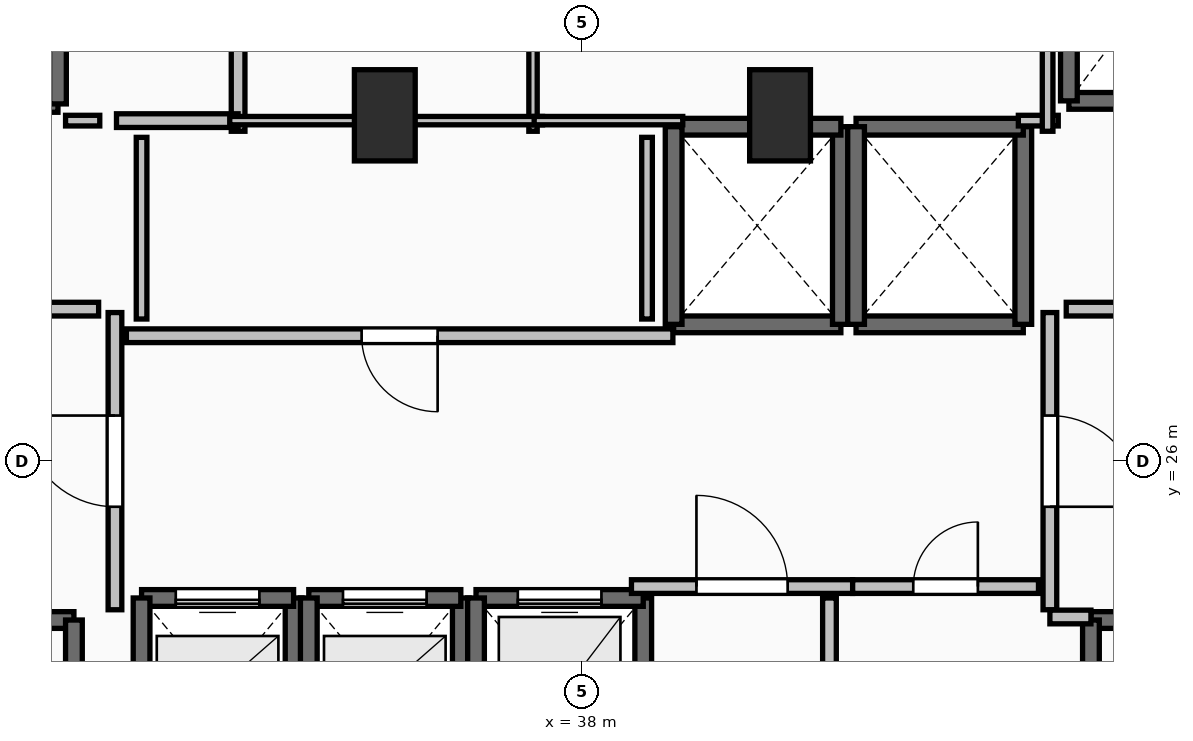
"""IFC4 building model, lengths in metres.
Left out: names, types, materials, properties, quantities, classifications, styles, units other than length and angle.
Written with IfcOpenShell. Run it as: python <this file> out.ifc"""

import sys

from ifc_helpers import new_model, si_unit, direction, frame, frame_2d, origin, origin_2d, place, context, subcontext, project, spatial, rectangle, extrude, element, fill, save


model = new_model("IFC4")
c1 = context("Model", 3, precision=1e-05, world=origin(), true_north=direction((0.0, 1.0)))
c2 = subcontext(c1, "Body", "Model", "MODEL_VIEW")
j1 = project(units=[si_unit("LENGTHUNIT", "METRE"), si_unit("PLANEANGLEUNIT", "RADIAN")], contexts=[c1])
p1 = place(None, origin())
s1 = spatial("IfcSite", under=j1, at=p1, CompositionType="ELEMENT")
p2 = place(p1, origin())
s2 = spatial("IfcBuilding", under=s1, at=p2, CompositionType="ELEMENT")
p3 = place(p2, frame((0.0, 0.0, 150.1)))
s3 = spatial("IfcBuildingStorey", under=s2, at=p3, CompositionType="ELEMENT", Elevation=150.1)
for number, where, z_axis, x_axis in (
    (1, (35.4, 30.55, 0.0), (0.0, 0.0, 1.0), (1.0, 0.0, 0.0)),
    (2, (40.6, 30.55, 0.0), (0.0, 0.0, 1.0), (1.0, 0.0, 0.0)),
):
    element("IfcColumn", number, at=place(p3, frame(where, z_axis=z_axis, x_axis=x_axis)), inside=s3, PredefinedType="PILASTER", context=c2, shape_type="SweptSolid", body=[
        extrude(rectangle(XDim=0.8, YDim=1.2, at=origin_2d()), origin(), (0.0, 0.0, 1.0), 3.5),
    ])
p4 = place(p3, frame((27.94, 23.91, 0.0), z_axis=(0.0, 0.0, 1.0), x_axis=(1.0, 0.0, 0.0)))
e3 = element("IfcWall", 3, at=p4, inside=s3, PredefinedType="SOLIDWALL", context=c2, shape_type="SweptSolid", body=[
    extrude(rectangle(XDim=3.37, YDim=0.22, at=frame_2d((1.685, 0.0))), origin(), (0.0, 0.0, 1.0), 3.24),
])
p5 = place(p4, frame((1.135, 0.0, 0.0)))
e4 = element("IfcOpeningElement", 4, at=p5, cuts=e3, PredefinedType="OPENING", context=c2, shape_type="SweptSolid", body=[
    extrude(rectangle(XDim=1.1, YDim=2.15, at=frame_2d((0.55, 1.075))), frame((0.0, 0.125, 0.0), z_axis=(0.0, -1.0, 0.0), x_axis=(1.0, 0.0, 0.0)), (0.0, 0.0, 1.0), 0.25),
])
p6 = place(p3, frame((31.31, 23.91, 0.0), z_axis=(0.0, 0.0, 1.0), x_axis=(0.0, -1.0, 0.0)))
e5 = element("IfcWall", 5, at=p6, inside=s3, PredefinedType="SOLIDWALL", context=c2, shape_type="SweptSolid", body=[
    extrude(rectangle(XDim=7.42, YDim=0.22, at=frame_2d((3.71, 0.0))), origin(), (0.0, 0.0, 1.0), 3.24),
])
p7 = place(p3, frame((44.69, 23.91, 0.0), z_axis=(0.0, 0.0, 1.0), x_axis=(1.0, 0.0, 0.0)))
e6 = element("IfcWall", 6, at=p7, inside=s3, PredefinedType="SOLIDWALL", context=c2, shape_type="SweptSolid", body=[
    extrude(rectangle(XDim=3.37, YDim=0.22, at=frame_2d((1.685, 0.0))), origin(), (0.0, 0.0, 1.0), 3.24),
])
p8 = place(p7, frame((1.135, 0.0, 0.0)))
e7 = element("IfcOpeningElement", 7, at=p8, cuts=e6, PredefinedType="OPENING", context=c2, shape_type="SweptSolid", body=[
    extrude(rectangle(XDim=1.1, YDim=2.15, at=frame_2d((0.55, 1.075))), frame((0.0, 0.125, 0.0), z_axis=(0.0, -1.0, 0.0), x_axis=(1.0, 0.0, 0.0)), (0.0, 0.0, 1.0), 0.25),
])
p9 = place(p3, frame((44.69, 16.49, 0.0), z_axis=(0.0, 0.0, 1.0), x_axis=(0.0, 1.0, 0.0)))
e8 = element("IfcWall", 8, at=p9, inside=s3, PredefinedType="SOLIDWALL", context=c2, shape_type="SweptSolid", body=[
    extrude(rectangle(XDim=7.42, YDim=0.22, at=frame_2d((3.71, 0.0))), origin(), (0.0, 0.0, 1.0), 3.24),
])
p10 = place(p3, frame((34.2, 21.8, 0.0), z_axis=(0.0, 0.0, 1.0), x_axis=(0.0, 1.0, 0.0)))
e9 = element("IfcWall", 9, at=p10, inside=s3, PredefinedType="SOLIDWALL", context=c2, shape_type="SweptSolid", body=[
    extrude(rectangle(XDim=2.4, YDim=0.22, at=frame_2d((1.2, 0.0))), origin(), (0.0, 0.0, 1.0), 3.24),
])
p11 = place(p3, frame((34.2, 24.2, 0.0), z_axis=(0.0, 0.0, 1.0), x_axis=(-1.0, 0.0, 0.0)))
e10 = element("IfcWall", 10, at=p11, inside=s3, PredefinedType="SOLIDWALL", context=c2, shape_type="SweptSolid", body=[
    extrude(rectangle(XDim=2.0, YDim=0.22, at=frame_2d((1.0, 0.0))), origin(), (0.0, 0.0, 1.0), 3.24),
])
p12 = place(p11, frame((0.45, 0.0, 0.0)))
e11 = element("IfcOpeningElement", 11, at=p12, cuts=e10, PredefinedType="OPENING", context=c2, shape_type="SweptSolid", body=[
    extrude(rectangle(XDim=1.1, YDim=2.2, at=frame_2d((0.55, 1.1))), frame((0.0, 0.125, 0.0), z_axis=(0.0, -1.0, 0.0), x_axis=(1.0, 0.0, 0.0)), (0.0, 0.0, 1.0), 0.25),
])
for number, where, z_axis, x_axis in (
    (12, (32.2, 24.2, 0.0), (0.0, 0.0, 1.0), (0.0, -1.0, 0.0)),
    (13, (36.4, 21.8, 0.0), (0.0, 0.0, 1.0), (0.0, 1.0, 0.0)),
):
    element("IfcWall", number, at=place(p3, frame(where, z_axis=z_axis, x_axis=x_axis)), inside=s3, PredefinedType="SOLIDWALL", context=c2, shape_type="SweptSolid", body=[
        extrude(rectangle(XDim=2.4, YDim=0.22, at=frame_2d((1.2, 0.0))), origin(), (0.0, 0.0, 1.0), 3.24),
    ])
p13 = place(p3, frame((36.4, 24.2, 0.0), z_axis=(0.0, 0.0, 1.0), x_axis=(-1.0, 0.0, 0.0)))
e14 = element("IfcWall", 14, at=p13, inside=s3, PredefinedType="SOLIDWALL", context=c2, shape_type="SweptSolid", body=[
    extrude(rectangle(XDim=2.0, YDim=0.22, at=frame_2d((1.0, 0.0))), origin(), (0.0, 0.0, 1.0), 3.24),
])
p14 = place(p13, frame((0.45, 0.0, 0.0)))
e15 = element("IfcOpeningElement", 15, at=p14, cuts=e14, PredefinedType="OPENING", context=c2, shape_type="SweptSolid", body=[
    extrude(rectangle(XDim=1.1, YDim=2.2, at=frame_2d((0.55, 1.1))), frame((0.0, 0.125, 0.0), z_axis=(0.0, -1.0, 0.0), x_axis=(1.0, 0.0, 0.0)), (0.0, 0.0, 1.0), 0.25),
])
p15 = place(p3, frame((34.4, 24.2, 0.0), z_axis=(0.0, 0.0, 1.0), x_axis=(0.0, -1.0, 0.0)))
e16 = element("IfcWall", 16, at=p15, inside=s3, PredefinedType="SOLIDWALL", context=c2, shape_type="SweptSolid", body=[
    extrude(rectangle(XDim=2.4, YDim=0.22, at=frame_2d((1.2, 0.0))), origin(), (0.0, 0.0, 1.0), 3.24),
])
p16 = place(p3, frame((38.8, 21.6, 0.0), z_axis=(0.0, 0.0, 1.0), x_axis=(0.0, 1.0, 0.0)))
e17 = element("IfcWall", 17, at=p16, inside=s3, PredefinedType="SOLIDWALL", context=c2, shape_type="SweptSolid", body=[
    extrude(rectangle(XDim=2.6, YDim=0.22, at=frame_2d((1.3, 0.0))), origin(), (0.0, 0.0, 1.0), 3.24),
])
p17 = place(p3, frame((38.8, 24.2, 0.0), z_axis=(0.0, 0.0, 1.0), x_axis=(-1.0, 0.0, 0.0)))
e18 = element("IfcWall", 18, at=p17, inside=s3, PredefinedType="SOLIDWALL", context=c2, shape_type="SweptSolid", body=[
    extrude(rectangle(XDim=2.2, YDim=0.22, at=frame_2d((1.1, 0.0))), origin(), (0.0, 0.0, 1.0), 3.24),
])
p18 = place(p17, frame((0.55, 0.0, 0.0)))
e19 = element("IfcOpeningElement", 19, at=p18, cuts=e18, PredefinedType="OPENING", context=c2, shape_type="SweptSolid", body=[
    extrude(rectangle(XDim=1.1, YDim=2.2, at=frame_2d((0.55, 1.1))), frame((0.0, 0.125, 0.0), z_axis=(0.0, -1.0, 0.0), x_axis=(1.0, 0.0, 0.0)), (0.0, 0.0, 1.0), 0.25),
])
p19 = place(p3, frame((36.6, 24.2, 0.0), z_axis=(0.0, 0.0, 1.0), x_axis=(0.0, -1.0, 0.0)))
e20 = element("IfcWall", 20, at=p19, inside=s3, PredefinedType="SOLIDWALL", context=c2, shape_type="SweptSolid", body=[
    extrude(rectangle(XDim=2.6, YDim=0.22, at=frame_2d((1.3, 0.0))), origin(), (0.0, 0.0, 1.0), 3.24),
])
p20 = place(p3, frame((39.2, 27.8, 0.0), z_axis=(0.0, 0.0, 1.0), x_axis=(1.0, 0.0, 0.0)))
e21 = element("IfcWall", 21, at=p20, inside=s3, PredefinedType="SOLIDWALL", context=c2, shape_type="SweptSolid", body=[
    extrude(rectangle(XDim=2.2, YDim=0.22, at=frame_2d((1.1, 0.0))), origin(), (0.0, 0.0, 1.0), 3.24),
])
p21 = place(p3, frame((41.4, 27.8, 0.0), z_axis=(0.0, 0.0, 1.0), x_axis=(0.0, 1.0, 0.0)))
e22 = element("IfcWall", 22, at=p21, inside=s3, PredefinedType="SOLIDWALL", context=c2, shape_type="SweptSolid", body=[
    extrude(rectangle(XDim=2.6, YDim=0.22, at=frame_2d((1.3, 0.0))), origin(), (0.0, 0.0, 1.0), 3.24),
])
p22 = place(p3, frame((41.4, 30.4, 0.0), z_axis=(0.0, 0.0, 1.0), x_axis=(-1.0, 0.0, 0.0)))
e23 = element("IfcWall", 23, at=p22, inside=s3, PredefinedType="SOLIDWALL", context=c2, shape_type="SweptSolid", body=[
    extrude(rectangle(XDim=2.2, YDim=0.22, at=frame_2d((1.1, 0.0))), origin(), (0.0, 0.0, 1.0), 3.24),
])
p23 = place(p3, frame((39.2, 30.4, 0.0), z_axis=(0.0, 0.0, 1.0), x_axis=(0.0, -1.0, 0.0)))
e24 = element("IfcWall", 24, at=p23, inside=s3, PredefinedType="SOLIDWALL", context=c2, shape_type="SweptSolid", body=[
    extrude(rectangle(XDim=2.6, YDim=0.22, at=frame_2d((1.3, 0.0))), origin(), (0.0, 0.0, 1.0), 3.24),
])
p24 = place(p3, frame((41.6, 27.8, 0.0), z_axis=(0.0, 0.0, 1.0), x_axis=(1.0, 0.0, 0.0)))
e25 = element("IfcWall", 25, at=p24, inside=s3, PredefinedType="SOLIDWALL", context=c2, shape_type="SweptSolid", body=[
    extrude(rectangle(XDim=2.2, YDim=0.22, at=frame_2d((1.1, 0.0))), origin(), (0.0, 0.0, 1.0), 3.24),
])
p25 = place(p3, frame((43.8, 27.8, 0.0), z_axis=(0.0, 0.0, 1.0), x_axis=(0.0, 1.0, 0.0)))
e26 = element("IfcWall", 26, at=p25, inside=s3, PredefinedType="SOLIDWALL", context=c2, shape_type="SweptSolid", body=[
    extrude(rectangle(XDim=2.6, YDim=0.22, at=frame_2d((1.3, 0.0))), origin(), (0.0, 0.0, 1.0), 3.24),
])
p26 = place(p3, frame((43.8, 30.4, 0.0), z_axis=(0.0, 0.0, 1.0), x_axis=(-1.0, 0.0, 0.0)))
e27 = element("IfcWall", 27, at=p26, inside=s3, PredefinedType="SOLIDWALL", context=c2, shape_type="SweptSolid", body=[
    extrude(rectangle(XDim=2.2, YDim=0.22, at=frame_2d((1.1, 0.0))), origin(), (0.0, 0.0, 1.0), 3.24),
])
p27 = place(p3, frame((41.6, 30.4, 0.0), z_axis=(0.0, 0.0, 1.0), x_axis=(0.0, -1.0, 0.0)))
e28 = element("IfcWall", 28, at=p27, inside=s3, PredefinedType="SOLIDWALL", context=c2, shape_type="SweptSolid", body=[
    extrude(rectangle(XDim=2.6, YDim=0.22, at=frame_2d((1.3, 0.0))), origin(), (0.0, 0.0, 1.0), 3.24),
])
p28 = place(p3, frame((44.4, 30.74, 0.0), z_axis=(0.0, 0.0, 1.0), x_axis=(1.0, 0.0, 0.0)))
e29 = element("IfcWall", 29, at=p28, inside=s3, PredefinedType="SOLIDWALL", context=c2, shape_type="SweptSolid", body=[
    extrude(rectangle(XDim=1.8, YDim=0.22, at=frame_2d((0.9, 0.0))), origin(), (0.0, 0.0, 1.0), 3.24),
])
p29 = place(p3, frame((44.4, 33.16, 0.0), z_axis=(0.0, 0.0, 1.0), x_axis=(0.0, -1.0, 0.0)))
e30 = element("IfcWall", 30, at=p29, inside=s3, PredefinedType="SOLIDWALL", context=c2, shape_type="SweptSolid", body=[
    extrude(rectangle(XDim=2.42, YDim=0.22, at=frame_2d((1.21, 0.0))), origin(), (0.0, 0.0, 1.0), 3.24),
])
p30 = place(p3, frame((28.1, 30.7, 0.0), z_axis=(0.0, 0.0, 1.0), x_axis=(1.0, 0.0, 0.0)))
e31 = element("IfcWall", 31, at=p30, inside=s3, PredefinedType="SOLIDWALL", context=c2, shape_type="SweptSolid", body=[
    extrude(rectangle(XDim=3.0, YDim=0.22, at=frame_2d((1.5, 0.0))), origin(), (0.0, 0.0, 1.0), 3.24),
])
p31 = place(p3, frame((31.1, 30.7, 0.0), z_axis=(0.0, 0.0, 1.0), x_axis=(0.0, 1.0, 0.0)))
e32 = element("IfcWall", 32, at=p31, inside=s3, PredefinedType="SOLIDWALL", context=c2, shape_type="SweptSolid", body=[
    extrude(rectangle(XDim=2.5, YDim=0.22, at=frame_2d((1.25, 0.0))), origin(), (0.0, 0.0, 1.0), 3.24),
])
p32 = place(p3, frame((31.85, 24.045, 0.0), z_axis=(0.0, 0.0, 1.0), x_axis=(0.0, 1.0, 0.0)))
e33 = element("IfcWall", 33, at=p32, inside=s3, PredefinedType="PARTITIONING", context=c2, shape_type="SweptSolid", body=[
    extrude(rectangle(XDim=3.91, YDim=0.18, at=frame_2d((1.955, 0.0))), origin(), (0.0, 0.0, 1.0), 3.24),
])
p33 = place(p32, frame((1.355, 0.0, 0.0)))
e34 = element("IfcOpeningElement", 34, at=p33, cuts=e33, PredefinedType="OPENING", context=c2, shape_type="SweptSolid", body=[
    extrude(rectangle(XDim=1.2, YDim=2.15, at=frame_2d((0.6, 1.075))), frame((0.0, 0.105, 0.0), z_axis=(0.0, -1.0, 0.0), x_axis=(1.0, 0.0, 0.0)), (0.0, 0.0, 1.0), 0.21),
])
p34 = place(p3, frame((44.15, 27.955, 0.0), z_axis=(0.0, 0.0, 1.0), x_axis=(0.0, -1.0, 0.0)))
e35 = element("IfcWall", 35, at=p34, inside=s3, PredefinedType="PARTITIONING", context=c2, shape_type="SweptSolid", body=[
    extrude(rectangle(XDim=3.91, YDim=0.18, at=frame_2d((1.955, 0.0))), origin(), (0.0, 0.0, 1.0), 3.24),
])
p35 = place(p34, frame((1.355, 0.0, 0.0)))
e36 = element("IfcOpeningElement", 36, at=p35, cuts=e35, PredefinedType="OPENING", context=c2, shape_type="SweptSolid", body=[
    extrude(rectangle(XDim=1.2, YDim=2.15, at=frame_2d((0.6, 1.075))), frame((0.0, 0.105, 0.0), z_axis=(0.0, -1.0, 0.0), x_axis=(1.0, 0.0, 0.0)), (0.0, 0.0, 1.0), 0.21),
])
p36 = place(p3, frame((44.15, 23.95, 0.0), z_axis=(0.0, 0.0, 1.0), x_axis=(1.0, 0.0, 0.0)))
e37 = element("IfcWall", 37, at=p36, inside=s3, PredefinedType="PARTITIONING", context=c2, shape_type="SweptSolid", body=[
    extrude(rectangle(XDim=0.54, YDim=0.18, at=frame_2d((0.27, 0.0))), origin(), (0.0, 0.0, 1.0), 3.24),
])
p37 = place(p3, frame((33.47, 30.34, 0.0), z_axis=(0.0, 0.0, 1.0), x_axis=(0.0, 1.0, 0.0)))
e38 = element("IfcWall", 38, at=p37, inside=s3, PredefinedType="PARTITIONING", context=c2, shape_type="SweptSolid", body=[
    extrude(rectangle(XDim=3.56, YDim=0.18, at=frame_2d((1.78, 0.0))), origin(), (0.0, 0.0, 1.0), 3.24),
])
p38 = place(p3, frame((31.87, 30.48, 0.0), z_axis=(0.0, 0.0, 1.0), x_axis=(1.0, 0.0, 0.0)))
e39 = element("IfcWall", 39, at=p38, inside=s3, PredefinedType="PARTITIONING", context=c2, shape_type="SweptSolid", body=[
    extrude(rectangle(XDim=1.6, YDim=0.18, at=frame_2d((0.8, 0.0))), origin(), (0.0, 0.0, 1.0), 3.24),
])
p39 = place(p3, frame((38.645, 24.35, 0.0), z_axis=(0.0, 0.0, 1.0), x_axis=(1.0, 0.0, 0.0)))
e40 = element("IfcWall", 40, at=p39, inside=s3, PredefinedType="PARTITIONING", context=c2, shape_type="SweptSolid", body=[
    extrude(rectangle(XDim=2.91, YDim=0.18, at=frame_2d((1.455, 0.0))), origin(), (0.0, 0.0, 1.0), 3.24),
])
p40 = place(p39, frame((0.855, 0.0, 0.0)))
e41 = element("IfcOpeningElement", 41, at=p40, cuts=e40, PredefinedType="OPENING", context=c2, shape_type="SweptSolid", body=[
    extrude(rectangle(XDim=1.2, YDim=2.15, at=frame_2d((0.6, 1.075))), frame((0.0, 0.105, 0.0), z_axis=(0.0, -1.0, 0.0), x_axis=(1.0, 0.0, 0.0)), (0.0, 0.0, 1.0), 0.21),
])
p41 = place(p3, frame((41.555, 24.35, 0.0), z_axis=(0.0, 0.0, 1.0), x_axis=(1.0, 0.0, 0.0)))
e42 = element("IfcWall", 42, at=p41, inside=s3, PredefinedType="PARTITIONING", context=c2, shape_type="SweptSolid", body=[
    extrude(rectangle(XDim=2.445, YDim=0.18, at=frame_2d((1.223, 0.0))), origin(), (0.0, 0.0, 1.0), 3.24),
])
p42 = place(p41, frame((0.798, 0.0, 0.0)))
e43 = element("IfcOpeningElement", 43, at=p42, cuts=e42, PredefinedType="OPENING", context=c2, shape_type="SweptSolid", body=[
    extrude(rectangle(XDim=0.85, YDim=2.1, at=frame_2d((0.425, 1.05))), frame((0.0, 0.105, 0.0), z_axis=(0.0, -1.0, 0.0), x_axis=(1.0, 0.0, 0.0)), (0.0, 0.0, 1.0), 0.21),
])
p43 = place(p3, frame((39.19, 27.65, 0.0), z_axis=(0.0, 0.0, 1.0), x_axis=(-1.0, 0.0, 0.0)))
e44 = element("IfcWall", 44, at=p43, inside=s3, PredefinedType="PARTITIONING", context=c2, shape_type="SweptSolid", body=[
    extrude(rectangle(XDim=7.19, YDim=0.18, at=frame_2d((3.595, 0.0))), origin(), (0.0, 0.0, 1.0), 3.24),
])
p44 = place(p43, frame((3.095, 0.0, 0.0)))
e45 = element("IfcOpeningElement", 45, at=p44, cuts=e44, PredefinedType="OPENING", context=c2, shape_type="SweptSolid", body=[
    extrude(rectangle(XDim=1.0, YDim=2.15, at=frame_2d((0.5, 1.075))), frame((0.0, 0.105, 0.0), z_axis=(0.0, -1.0, 0.0), x_axis=(1.0, 0.0, 0.0)), (0.0, 0.0, 1.0), 0.21),
])
p45 = place(p3, frame((41.25, 20.305, 0.0), z_axis=(0.0, 0.0, 1.0), x_axis=(0.0, 1.0, 0.0)))
e46 = element("IfcWall", 46, at=p45, inside=s3, PredefinedType="PARTITIONING", context=c2, shape_type="SweptSolid", body=[
    extrude(rectangle(XDim=3.895, YDim=0.18, at=frame_2d((1.948, 0.0))), origin(), (0.0, 0.0, 1.0), 3.24),
])
p46 = place(p45, frame((1.522, 0.0, 0.0)))
e47 = element("IfcOpeningElement", 47, at=p46, cuts=e46, PredefinedType="OPENING", context=c2, shape_type="SweptSolid", body=[
    extrude(rectangle(XDim=0.85, YDim=2.1, at=frame_2d((0.425, 1.05))), frame((0.0, 0.105, 0.0), z_axis=(0.0, -1.0, 0.0), x_axis=(1.0, 0.0, 0.0)), (0.0, 0.0, 1.0), 0.21),
])
p47 = place(p3, frame((37.35, 30.34, 0.0), z_axis=(0.0, 0.0, 1.0), x_axis=(0.0, 1.0, 0.0)))
e48 = element("IfcWall", 48, at=p47, inside=s3, PredefinedType="PARTITIONING", context=c2, shape_type="SweptSolid", body=[
    extrude(rectangle(XDim=3.56, YDim=0.11, at=frame_2d((1.78, 0.0))), origin(), (0.0, 0.0, 1.0), 2.432),
])
p48 = place(p3, frame((33.36, 30.48, 0.0), z_axis=(0.0, 0.0, 1.0), x_axis=(1.0, 0.0, 0.0)))
e49 = element("IfcWall", 49, at=p48, inside=s3, PredefinedType="PARTITIONING", context=c2, shape_type="SweptSolid", body=[
    extrude(rectangle(XDim=4.115, YDim=0.11, at=frame_2d((2.058, 0.0))), origin(), (0.0, 0.0, 1.0), 2.432),
])
p49 = place(p3, frame((37.365, 30.48, 0.0), z_axis=(0.0, 0.0, 1.0), x_axis=(1.0, 0.0, 0.0)))
e50 = element("IfcWall", 50, at=p49, inside=s3, PredefinedType="PARTITIONING", context=c2, shape_type="SweptSolid", body=[
    extrude(rectangle(XDim=1.955, YDim=0.11, at=frame_2d((0.978, 0.0))), origin(), (0.0, 0.0, 1.0), 2.432),
])
for number, where, z_axis, x_axis in (
    (51, (31.635, 28.0, 0.0), (0.0, 0.0, 1.0), (-1.0, 0.0, 0.0)),
    (52, (45.28, 28.0, 0.0), (0.0, 0.0, 1.0), (-1.0, 0.0, 0.0)),
):
    element("IfcWall", number, at=place(p3, frame(where, z_axis=z_axis, x_axis=x_axis)), inside=s3, PredefinedType="PARTITIONING", context=c2, shape_type="SweptSolid", body=[
        extrude(rectangle(XDim=0.915, YDim=0.18, at=frame_2d((0.458, 0.0))), origin(), (0.0, 0.0, 1.0), 3.24),
    ])
p50 = place(p3, frame((31.2, 30.48, 0.0), z_axis=(0.0, 0.0, 1.0), x_axis=(1.0, 0.0, 0.0)))
e53 = element("IfcWall", 53, at=p50, inside=s3, PredefinedType="PARTITIONING", context=c2, shape_type="SweptSolid", body=[
    extrude(rectangle(XDim=0.45, YDim=0.14, at=frame_2d((0.225, 0.0))), origin(), (0.0, 0.0, 1.0), 3.24),
])
p51 = place(p3, frame((43.735, 30.48, 0.0), z_axis=(0.0, 0.0, 1.0), x_axis=(1.0, 0.0, 0.0)))
e54 = element("IfcWall", 54, at=p51, inside=s3, PredefinedType="PARTITIONING", context=c2, shape_type="SweptSolid", body=[
    extrude(rectangle(XDim=0.525, YDim=0.14, at=frame_2d((0.262, 0.0))), origin(), (0.0, 0.0, 1.0), 3.24),
])
p52 = place(p3, frame((44.12, 30.34, 0.0), z_axis=(0.0, 0.0, 1.0), x_axis=(0.0, 1.0, 0.0)))
e55 = element("IfcWall", 55, at=p52, inside=s3, PredefinedType="PARTITIONING", context=c2, shape_type="SweptSolid", body=[
    extrude(rectangle(XDim=2.66, YDim=0.14, at=frame_2d((1.33, 0.0))), origin(), (0.0, 0.0, 1.0), 3.24),
])
for number, where, z_axis, x_axis in (
    (56, (32.2, 30.26, 0.0), (0.0, 0.0, 1.0), (0.0, -1.0, 0.0)),
    (57, (38.85, 27.87, 0.0), (0.0, 0.0, 1.0), (0.0, 1.0, 0.0)),
):
    element("IfcWall", number, at=place(p3, frame(where, z_axis=z_axis, x_axis=x_axis)), inside=s3, PredefinedType="PARTITIONING", context=c2, shape_type="SweptSolid", body=[
        extrude(rectangle(XDim=2.39, YDim=0.14, at=frame_2d((1.195, 0.0))), origin(), (0.0, 0.0, 1.0), 3.24),
    ])
p53 = place(p12, origin())
e58 = element("IfcDoor", 58, at=p53, inside=s3, OperationType="SLIDING_TO_LEFT", PredefinedType="DOOR", context=c2, shape_type="SweptSolid", body=[
    extrude(rectangle(XDim=1.1, YDim=2.2, at=frame_2d((0.55, 1.1))), frame((0.0, 0.025, 0.0), z_axis=(0.0, -1.0, 0.0), x_axis=(1.0, 0.0, 0.0)), (0.0, 0.0, 1.0), 0.05),
])
fill(e11, e58)
p54 = place(p14, origin())
e59 = element("IfcDoor", 59, at=p54, inside=s3, OperationType="SLIDING_TO_LEFT", PredefinedType="DOOR", context=c2, shape_type="SweptSolid", body=[
    extrude(rectangle(XDim=1.1, YDim=2.2, at=frame_2d((0.55, 1.1))), frame((0.0, 0.025, 0.0), z_axis=(0.0, -1.0, 0.0), x_axis=(1.0, 0.0, 0.0)), (0.0, 0.0, 1.0), 0.05),
])
fill(e15, e59)
p55 = place(p18, origin())
e60 = element("IfcDoor", 60, at=p55, inside=s3, OperationType="SLIDING_TO_LEFT", PredefinedType="DOOR", context=c2, shape_type="SweptSolid", body=[
    extrude(rectangle(XDim=1.1, YDim=2.2, at=frame_2d((0.55, 1.1))), frame((0.0, 0.025, 0.0), z_axis=(0.0, -1.0, 0.0), x_axis=(1.0, 0.0, 0.0)), (0.0, 0.0, 1.0), 0.05),
])
fill(e19, e60)
p56 = place(p33, origin())
e61 = element("IfcDoor", 61, at=p56, inside=s3, OperationType="SINGLE_SWING_RIGHT", PredefinedType="DOOR", context=c2, shape_type="SweptSolid", body=[
    extrude(rectangle(XDim=1.2, YDim=2.15, at=frame_2d((0.6, 1.075))), frame((0.0, 0.025, 0.0), z_axis=(0.0, -1.0, 0.0), x_axis=(1.0, 0.0, 0.0)), (0.0, 0.0, 1.0), 0.05),
])
fill(e34, e61)
p57 = place(p35, origin())
e62 = element("IfcDoor", 62, at=p57, inside=s3, OperationType="SINGLE_SWING_RIGHT", PredefinedType="DOOR", context=c2, shape_type="SweptSolid", body=[
    extrude(rectangle(XDim=1.2, YDim=2.15, at=frame_2d((0.6, 1.075))), frame((0.0, 0.025, 0.0), z_axis=(0.0, -1.0, 0.0), x_axis=(1.0, 0.0, 0.0)), (0.0, 0.0, 1.0), 0.05),
])
fill(e36, e62)
p58 = place(p40, origin())
e63 = element("IfcDoor", 63, at=p58, inside=s3, OperationType="SINGLE_SWING_LEFT", PredefinedType="DOOR", context=c2, shape_type="SweptSolid", body=[
    extrude(rectangle(XDim=1.2, YDim=2.15, at=frame_2d((0.6, 1.075))), frame((0.0, 0.025, 0.0), z_axis=(0.0, -1.0, 0.0), x_axis=(1.0, 0.0, 0.0)), (0.0, 0.0, 1.0), 0.05),
])
fill(e41, e63)
p59 = place(p42, origin())
e64 = element("IfcDoor", 64, at=p59, inside=s3, OperationType="SINGLE_SWING_RIGHT", PredefinedType="DOOR", context=c2, shape_type="SweptSolid", body=[
    extrude(rectangle(XDim=0.85, YDim=2.1, at=frame_2d((0.425, 1.05))), frame((0.0, 0.025, 0.0), z_axis=(0.0, -1.0, 0.0), x_axis=(1.0, 0.0, 0.0)), (0.0, 0.0, 1.0), 0.05),
])
fill(e43, e64)
p60 = place(p44, origin())
e65 = element("IfcDoor", 65, at=p60, inside=s3, OperationType="SINGLE_SWING_LEFT", PredefinedType="DOOR", context=c2, shape_type="SweptSolid", body=[
    extrude(rectangle(XDim=1.0, YDim=2.15, at=frame_2d((0.5, 1.075))), frame((0.0, 0.025, 0.0), z_axis=(0.0, -1.0, 0.0), x_axis=(1.0, 0.0, 0.0)), (0.0, 0.0, 1.0), 0.05),
])
fill(e45, e65)
save(model, sys.argv[1])
